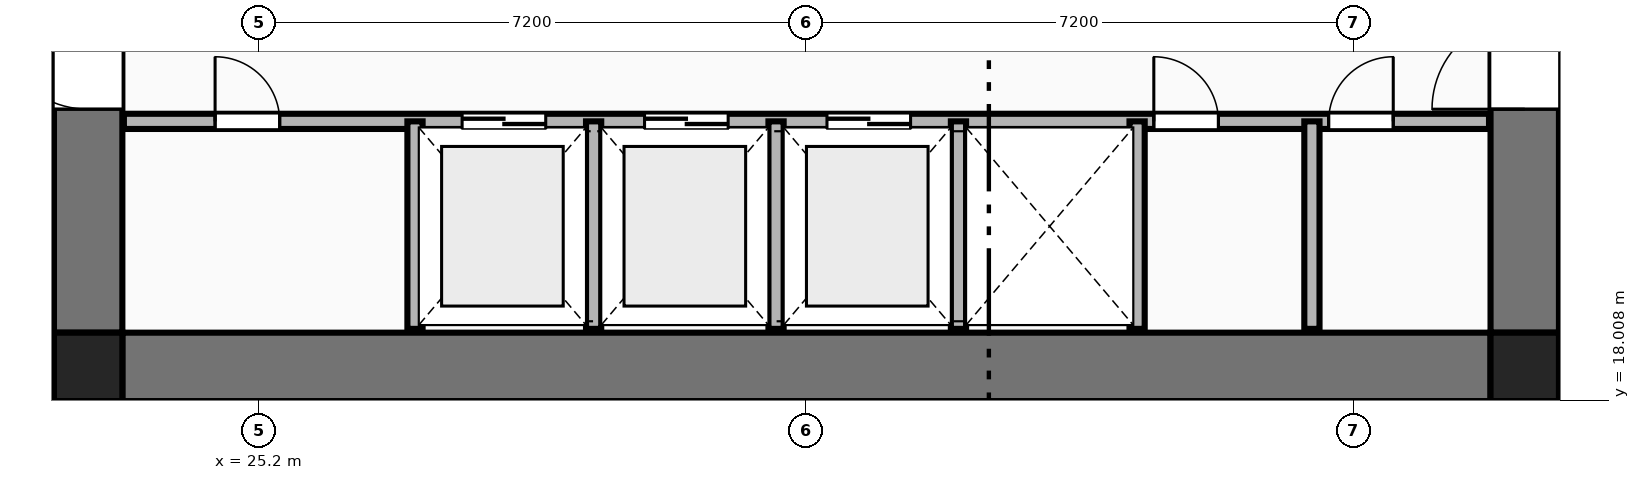
"""IFC4 building model, lengths in metres.
Left out: names, types, materials, properties, quantities, classifications, styles, units other than length and angle.
Written with IfcOpenShell. Run it as: python <this file> out.ifc"""

import sys

from ifc_helpers import new_model, si_unit, direction, frame, frame_2d, origin, origin_2d, place, context, subcontext, project, spatial, rectangle, extrude, element, fill, save


model = new_model("IFC4")
c1 = context("Model", 3, precision=1e-05, world=origin(), true_north=direction((0.0, 1.0)))
c2 = subcontext(c1, "Body", "Model", "MODEL_VIEW")
j1 = project(units=[si_unit("LENGTHUNIT", "METRE"), si_unit("PLANEANGLEUNIT", "RADIAN")], contexts=[c1])
p1 = place(None, origin())
s1 = spatial("IfcSite", under=j1, at=p1, CompositionType="ELEMENT")
p2 = place(p1, origin())
s2 = spatial("IfcBuilding", under=s1, at=p2, CompositionType="ELEMENT")
p3 = place(p2, frame((0.0, 0.0, 32.0)))
s3 = spatial("IfcBuildingStorey", under=s2, at=p3, CompositionType="ELEMENT", Elevation=32.0)
for number, where, z_axis, x_axis in (
    (1, (22.95, 18.45, 0.0), (0.0, 0.0, 1.0), (1.0, 0.0, 0.0)),
    (2, (41.85, 18.45, 0.0), (0.0, 0.0, 1.0), (1.0, 0.0, 0.0)),
):
    element("IfcColumn", number, at=place(p3, frame(where, z_axis=z_axis, x_axis=x_axis)), inside=s3, PredefinedType="COLUMN", context=c2, shape_type="SweptSolid", body=[
        extrude(rectangle(XDim=0.9, YDim=0.9, at=origin_2d()), origin(), (0.0, 0.0, 1.0), 3.55),
    ])
p4 = place(p3, frame((23.4, 18.45, 0.0), z_axis=(0.0, 0.0, 1.0), x_axis=(1.0, 0.0, 0.0)))
e3 = element("IfcWall", 3, at=p4, inside=s3, PredefinedType="SHEAR", context=c2, shape_type="SweptSolid", body=[
    extrude(rectangle(XDim=18.0, YDim=0.9, at=frame_2d((9.0, 0.0))), origin(), (0.0, 0.0, 1.0), 3.33),
])
p5 = place(p3, frame((22.95, 18.9, 0.0), z_axis=(0.0, 0.0, 1.0), x_axis=(0.0, 1.0, 0.0)))
e4 = element("IfcWall", 4, at=p5, inside=s3, PredefinedType="SHEAR", context=c2, shape_type="SweptSolid", body=[
    extrude(rectangle(XDim=14.0, YDim=0.9, at=frame_2d((7.0, 0.0))), origin(), (0.0, 0.0, 1.0), 3.33),
])
p6 = place(p5, frame((2.94, 0.0, 0.0)))
e5 = element("IfcOpeningElement", 5, at=p6, cuts=e4, PredefinedType="OPENING", context=c2, shape_type="SweptSolid", body=[
    extrude(rectangle(XDim=1.22, YDim=2.25, at=frame_2d((0.61, 1.125))), frame((0.0, 0.46, 0.0), z_axis=(0.0, -1.0, 0.0), x_axis=(1.0, 0.0, 0.0)), (0.0, 0.0, 1.0), 0.92),
])
p7 = place(p3, frame((41.85, 18.9, 0.0), z_axis=(0.0, 0.0, 1.0), x_axis=(0.0, 1.0, 0.0)))
e6 = element("IfcWall", 6, at=p7, inside=s3, PredefinedType="SHEAR", context=c2, shape_type="SweptSolid", body=[
    extrude(rectangle(XDim=14.0, YDim=0.9, at=frame_2d((7.0, 0.0))), origin(), (0.0, 0.0, 1.0), 3.33),
])
p8 = place(p7, frame((2.94, 0.0, 0.0)))
e7 = element("IfcOpeningElement", 7, at=p8, cuts=e6, PredefinedType="OPENING", context=c2, shape_type="SweptSolid", body=[
    extrude(rectangle(XDim=1.22, YDim=2.25, at=frame_2d((0.61, 1.125))), frame((0.0, 0.46, 0.0), z_axis=(0.0, -1.0, 0.0), x_axis=(1.0, 0.0, 0.0)), (0.0, 0.0, 1.0), 0.92),
])
p9 = place(p3, frame((23.42, 21.68, 0.0), z_axis=(0.0, 0.0, 1.0), x_axis=(1.0, 0.0, 0.0)))
e8 = element("IfcWall", 8, at=p9, inside=s3, PredefinedType="PLUMBINGWALL", context=c2, shape_type="SweptSolid", body=[
    extrude(rectangle(XDim=17.96, YDim=0.2, at=frame_2d((8.98, 0.0))), origin(), (0.0, 0.0, 1.0), 3.33),
])
p10 = place(p9, frame((4.45, 0.0, 0.0)))
e9 = element("IfcOpeningElement", 9, at=p10, cuts=e8, PredefinedType="OPENING", context=c2, shape_type="SweptSolid", body=[
    extrude(rectangle(XDim=1.1, YDim=2.2, at=frame_2d((0.55, 1.1))), frame((0.0, 0.11, 0.0), z_axis=(0.0, -1.0, 0.0), x_axis=(1.0, 0.0, 0.0)), (0.0, 0.0, 1.0), 0.22),
])
p11 = place(p9, frame((6.85, 0.0, 0.0)))
e10 = element("IfcOpeningElement", 10, at=p11, cuts=e8, PredefinedType="OPENING", context=c2, shape_type="SweptSolid", body=[
    extrude(rectangle(XDim=1.1, YDim=2.2, at=frame_2d((0.55, 1.1))), frame((0.0, 0.11, 0.0), z_axis=(0.0, -1.0, 0.0), x_axis=(1.0, 0.0, 0.0)), (0.0, 0.0, 1.0), 0.22),
])
p12 = place(p9, frame((9.25, 0.0, 0.0)))
e11 = element("IfcOpeningElement", 11, at=p12, cuts=e8, PredefinedType="OPENING", context=c2, shape_type="SweptSolid", body=[
    extrude(rectangle(XDim=1.1, YDim=2.2, at=frame_2d((0.55, 1.1))), frame((0.0, 0.11, 0.0), z_axis=(0.0, -1.0, 0.0), x_axis=(1.0, 0.0, 0.0)), (0.0, 0.0, 1.0), 0.22),
])
p13 = place(p9, frame((1.2, 0.0, 0.0)))
e12 = element("IfcOpeningElement", 12, at=p13, cuts=e8, PredefinedType="OPENING", context=c2, shape_type="SweptSolid", body=[
    extrude(rectangle(XDim=0.85, YDim=2.05, at=frame_2d((0.425, 1.025))), frame((0.0, 0.11, 0.0), z_axis=(0.0, -1.0, 0.0), x_axis=(1.0, 0.0, 0.0)), (0.0, 0.0, 1.0), 0.22),
])
p14 = place(p9, frame((13.55, 0.0, 0.0)))
e13 = element("IfcOpeningElement", 13, at=p14, cuts=e8, PredefinedType="OPENING", context=c2, shape_type="SweptSolid", body=[
    extrude(rectangle(XDim=0.85, YDim=2.05, at=frame_2d((0.425, 1.025))), frame((0.0, 0.11, 0.0), z_axis=(0.0, -1.0, 0.0), x_axis=(1.0, 0.0, 0.0)), (0.0, 0.0, 1.0), 0.22),
])
p15 = place(p9, frame((15.85, 0.0, 0.0)))
e14 = element("IfcOpeningElement", 14, at=p15, cuts=e8, PredefinedType="OPENING", context=c2, shape_type="SweptSolid", body=[
    extrude(rectangle(XDim=0.85, YDim=2.05, at=frame_2d((0.425, 1.025))), frame((0.0, 0.11, 0.0), z_axis=(0.0, -1.0, 0.0), x_axis=(1.0, 0.0, 0.0)), (0.0, 0.0, 1.0), 0.22),
])
for number, where, z_axis, x_axis in (
    (15, (27.25, 18.95, 0.0), (0.0, 0.0, 1.0), (0.0, 1.0, 0.0)),
    (16, (29.6, 18.95, 0.0), (0.0, 0.0, 1.0), (0.0, 1.0, 0.0)),
    (17, (32.0, 18.95, 0.0), (0.0, 0.0, 1.0), (0.0, 1.0, 0.0)),
    (18, (34.4, 18.95, 0.0), (0.0, 0.0, 1.0), (0.0, 1.0, 0.0)),
    (19, (36.75, 18.95, 0.0), (0.0, 0.0, 1.0), (0.0, 1.0, 0.0)),
    (20, (39.05, 18.95, 0.0), (0.0, 0.0, 1.0), (0.0, 1.0, 0.0)),
):
    element("IfcWall", number, at=place(p3, frame(where, z_axis=z_axis, x_axis=x_axis)), inside=s3, PredefinedType="PLUMBINGWALL", context=c2, shape_type="SweptSolid", body=[
        extrude(rectangle(XDim=2.73, YDim=0.2, at=frame_2d((1.365, 0.0))), origin(), (0.0, 0.0, 1.0), 3.33),
    ])
p16 = place(p6, origin())
e21 = element("IfcDoor", 21, at=p16, inside=s3, OperationType="SINGLE_SWING_RIGHT", PredefinedType="DOOR", context=c2, shape_type="SweptSolid", body=[
    extrude(rectangle(XDim=1.22, YDim=2.25, at=frame_2d((0.61, 1.125))), frame((0.0, 0.025, 0.0), z_axis=(0.0, -1.0, 0.0), x_axis=(1.0, 0.0, 0.0)), (0.0, 0.0, 1.0), 0.05),
])
fill(e5, e21)
p17 = place(p8, origin())
e22 = element("IfcDoor", 22, at=p17, inside=s3, OperationType="SINGLE_SWING_LEFT", PredefinedType="DOOR", context=c2, shape_type="SweptSolid", body=[
    extrude(rectangle(XDim=1.22, YDim=2.25, at=frame_2d((0.61, 1.125))), frame((0.0, 0.025, 0.0), z_axis=(0.0, -1.0, 0.0), x_axis=(1.0, 0.0, 0.0)), (0.0, 0.0, 1.0), 0.05),
])
fill(e7, e22)
p18 = place(p10, origin())
e23 = element("IfcDoor", 23, at=p18, inside=s3, OperationType="DOUBLE_DOOR_SLIDING", PredefinedType="DOOR", context=c2, shape_type="SweptSolid", body=[
    extrude(rectangle(XDim=1.1, YDim=2.2, at=frame_2d((0.55, 1.1))), frame((0.0, 0.025, 0.0), z_axis=(0.0, -1.0, 0.0), x_axis=(1.0, 0.0, 0.0)), (0.0, 0.0, 1.0), 0.05),
])
fill(e9, e23)
p19 = place(p11, origin())
e24 = element("IfcDoor", 24, at=p19, inside=s3, OperationType="DOUBLE_DOOR_SLIDING", PredefinedType="DOOR", context=c2, shape_type="SweptSolid", body=[
    extrude(rectangle(XDim=1.1, YDim=2.2, at=frame_2d((0.55, 1.1))), frame((0.0, 0.025, 0.0), z_axis=(0.0, -1.0, 0.0), x_axis=(1.0, 0.0, 0.0)), (0.0, 0.0, 1.0), 0.05),
])
fill(e10, e24)
p20 = place(p12, origin())
e25 = element("IfcDoor", 25, at=p20, inside=s3, OperationType="DOUBLE_DOOR_SLIDING", PredefinedType="DOOR", context=c2, shape_type="SweptSolid", body=[
    extrude(rectangle(XDim=1.1, YDim=2.2, at=frame_2d((0.55, 1.1))), frame((0.0, 0.025, 0.0), z_axis=(0.0, -1.0, 0.0), x_axis=(1.0, 0.0, 0.0)), (0.0, 0.0, 1.0), 0.05),
])
fill(e11, e25)
p21 = place(p13, origin())
e26 = element("IfcDoor", 26, at=p21, inside=s3, OperationType="SINGLE_SWING_LEFT", PredefinedType="DOOR", context=c2, shape_type="SweptSolid", body=[
    extrude(rectangle(XDim=0.85, YDim=2.05, at=frame_2d((0.425, 1.025))), frame((0.0, 0.025, 0.0), z_axis=(0.0, -1.0, 0.0), x_axis=(1.0, 0.0, 0.0)), (0.0, 0.0, 1.0), 0.05),
])
fill(e12, e26)
p22 = place(p14, origin())
e27 = element("IfcDoor", 27, at=p22, inside=s3, OperationType="SINGLE_SWING_LEFT", PredefinedType="DOOR", context=c2, shape_type="SweptSolid", body=[
    extrude(rectangle(XDim=0.85, YDim=2.05, at=frame_2d((0.425, 1.025))), frame((0.0, 0.025, 0.0), z_axis=(0.0, -1.0, 0.0), x_axis=(1.0, 0.0, 0.0)), (0.0, 0.0, 1.0), 0.05),
])
fill(e13, e27)
p23 = place(p15, origin())
e28 = element("IfcDoor", 28, at=p23, inside=s3, OperationType="SINGLE_SWING_RIGHT", PredefinedType="DOOR", context=c2, shape_type="SweptSolid", body=[
    extrude(rectangle(XDim=0.85, YDim=2.05, at=frame_2d((0.425, 1.025))), frame((0.0, 0.025, 0.0), z_axis=(0.0, -1.0, 0.0), x_axis=(1.0, 0.0, 0.0)), (0.0, 0.0, 1.0), 0.05),
])
fill(e14, e28)
save(model, sys.argv[1])
